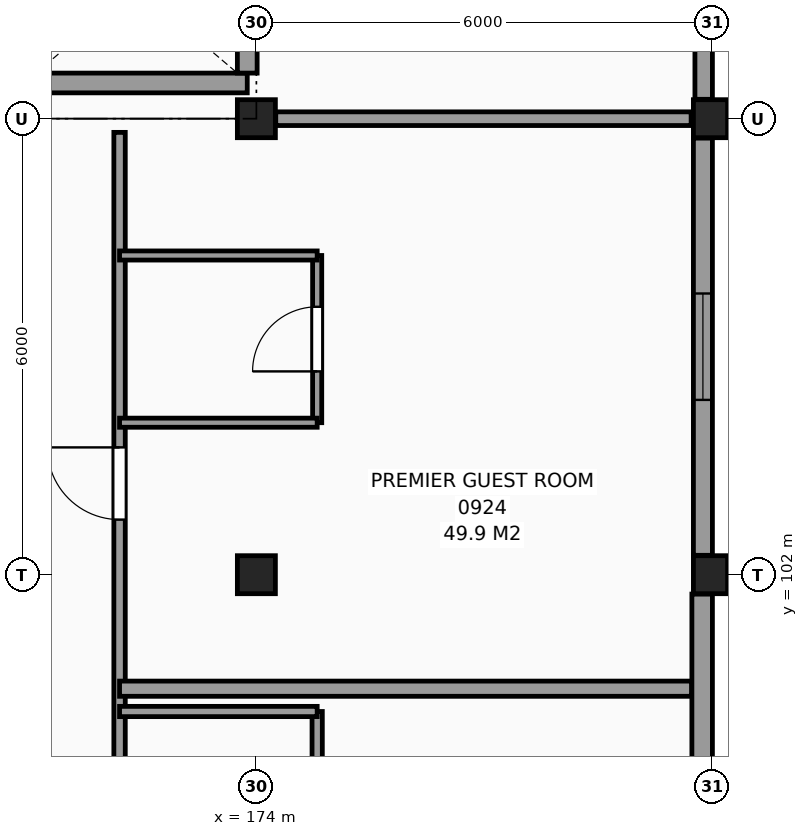
"""IFC4 building model, lengths in metres.
Left out: names, types, materials, properties, quantities, classifications, styles, units other than length and angle.
Written with IfcOpenShell. Run it as: python <this file> out.ifc"""

import sys

from ifc_helpers import new_model, si_unit, direction, frame, frame_2d, origin, origin_2d, place, context, subcontext, project, spatial, rectangle, extrude, element, fill, save


model = new_model("IFC4")
c1 = context("Model", 3, precision=1e-05, world=origin(), true_north=direction((0.0, 1.0)))
c2 = subcontext(c1, "Body", "Model", "MODEL_VIEW")
j1 = project(units=[si_unit("LENGTHUNIT", "METRE"), si_unit("PLANEANGLEUNIT", "RADIAN")], contexts=[c1])
p1 = place(None, origin())
s1 = spatial("IfcSite", under=j1, at=p1, CompositionType="ELEMENT")
p2 = place(p1, origin())
s2 = spatial("IfcBuilding", under=s1, at=p2, CompositionType="ELEMENT")
p3 = place(p2, frame((0.0, 0.0, 38.1)))
s3 = spatial("IfcBuildingStorey", under=s2, at=p3, CompositionType="ELEMENT", Elevation=38.1)
for number, where, z_axis, x_axis in (
    (1, (174.0, 102.0, 0.0), (0.0, 0.0, 1.0), (1.0, 0.0, 0.0)),
    (2, (174.0, 108.0, 0.0), (0.0, 0.0, 1.0), (1.0, 0.0, 0.0)),
    (3, (180.0, 102.0, 0.0), (0.0, 0.0, 1.0), (1.0, 0.0, 0.0)),
    (4, (180.0, 108.0, 0.0), (0.0, 0.0, 1.0), (1.0, 0.0, 0.0)),
):
    element("IfcColumn", number, at=place(p3, frame(where, z_axis=z_axis, x_axis=x_axis)), inside=s3, PredefinedType="COLUMN", context=c2, shape_type="SweptSolid", body=[
        extrude(rectangle(XDim=0.5, YDim=0.5, at=origin_2d()), origin(), (0.0, 0.0, 1.0), 3.3),
    ])
p4 = place(p3, frame((179.865, 96.255, 0.0), z_axis=(0.0, 0.0, 1.0), x_axis=(0.0, 1.0, 0.0)))
e5 = element("IfcWall", 5, at=p4, inside=s3, PredefinedType="SOLIDWALL", context=c2, shape_type="SweptSolid", body=[
    extrude(rectangle(XDim=5.49, YDim=0.27, at=frame_2d((2.745, 0.0))), origin(), (0.0, 0.0, 1.0), 2.41),
])
p5 = place(p4, frame((1.432, 0.0, 0.8)))
e6 = element("IfcOpeningElement", 6, at=p5, cuts=e5, PredefinedType="OPENING", context=c2, shape_type="SweptSolid", body=[
    extrude(rectangle(XDim=1.4, YDim=1.4, at=frame_2d((0.7, 0.7))), frame((0.0, 0.145, 0.0), z_axis=(0.0, -1.0, 0.0), x_axis=(1.0, 0.0, 0.0)), (0.0, 0.0, 1.0), 0.29),
])
p6 = place(p3, frame((179.875, 102.255, 0.0), z_axis=(0.0, 0.0, 1.0), x_axis=(0.0, 1.0, 0.0)))
e7 = element("IfcWall", 7, at=p6, inside=s3, PredefinedType="SOLIDWALL", context=c2, shape_type="SweptSolid", body=[
    extrude(rectangle(XDim=5.49, YDim=0.25, at=frame_2d((2.745, 0.0))), origin(), (0.0, 0.0, 1.0), 2.41),
])
p7 = place(p6, frame((2.045, 0.0, 0.8)))
e8 = element("IfcOpeningElement", 8, at=p7, cuts=e7, PredefinedType="OPENING", context=c2, shape_type="SweptSolid", body=[
    extrude(rectangle(XDim=1.4, YDim=1.4, at=frame_2d((0.7, 0.7))), frame((0.0, 0.135, 0.0), z_axis=(0.0, -1.0, 0.0), x_axis=(1.0, 0.0, 0.0)), (0.0, 0.0, 1.0), 0.27),
])
p8 = place(p3, frame((179.885, 108.255, 0.0), z_axis=(0.0, 0.0, 1.0), x_axis=(0.0, 1.0, 0.0)))
e9 = element("IfcWall", 9, at=p8, inside=s3, PredefinedType="SOLIDWALL", context=c2, shape_type="SweptSolid", body=[
    extrude(rectangle(XDim=5.49, YDim=0.23, at=frame_2d((2.745, 0.0))), origin(), (0.0, 0.0, 1.0), 2.41),
])
p9 = place(p3, frame((170.97, 108.47, 0.0), z_axis=(0.0, 0.0, 1.0), x_axis=(1.0, 0.0, 0.0)))
e10 = element("IfcWall", 10, at=p9, inside=s3, PredefinedType="SHEAR", context=c2, shape_type="SweptSolid", body=[
    extrude(rectangle(XDim=2.91, YDim=0.26, at=frame_2d((1.455, 0.0))), origin(), (0.0, 0.0, 1.0), 3.3),
])
p10 = place(p3, frame((173.88, 108.6, 0.0), z_axis=(0.0, 0.0, 1.0), x_axis=(0.0, 1.0, 0.0)))
e11 = element("IfcWall", 11, at=p10, inside=s3, PredefinedType="SHEAR", context=c2, shape_type="SweptSolid", body=[
    extrude(rectangle(XDim=2.25, YDim=0.26, at=frame_2d((1.125, 0.0))), origin(), (0.0, 0.0, 1.0), 3.3),
])
p11 = place(p3, frame((172.2, 42.215, 0.0), z_axis=(0.0, 0.0, 1.0), x_axis=(0.0, 1.0, 0.0)))
e12 = element("IfcWall", 12, at=p11, inside=s3, PredefinedType="PARTITIONING", context=c2, shape_type="SweptSolid", body=[
    extrude(rectangle(XDim=65.605, YDim=0.15, at=frame_2d((32.802, 0.0))), origin(), (0.0, 0.0, 1.0), 3.06),
])
p12 = place(p11, frame((0.46, 0.0, 0.0)))
e13 = element("IfcOpeningElement", 13, at=p12, cuts=e12, PredefinedType="OPENING", context=c2, shape_type="SweptSolid", body=[
    extrude(rectangle(XDim=0.95, YDim=2.1, at=frame_2d((0.475, 1.05))), frame((0.0, 0.085, 0.0), z_axis=(0.0, -1.0, 0.0), x_axis=(1.0, 0.0, 0.0)), (0.0, 0.0, 1.0), 0.17),
])
p13 = place(p11, frame((4.91, 0.0, 0.0)))
e14 = element("IfcOpeningElement", 14, at=p13, cuts=e12, PredefinedType="OPENING", context=c2, shape_type="SweptSolid", body=[
    extrude(rectangle(XDim=0.95, YDim=2.1, at=frame_2d((0.475, 1.05))), frame((0.0, 0.085, 0.0), z_axis=(0.0, -1.0, 0.0), x_axis=(1.0, 0.0, 0.0)), (0.0, 0.0, 1.0), 0.17),
])
p14 = place(p11, frame((12.11, 0.0, 0.0)))
e15 = element("IfcOpeningElement", 15, at=p14, cuts=e12, PredefinedType="OPENING", context=c2, shape_type="SweptSolid", body=[
    extrude(rectangle(XDim=0.95, YDim=2.1, at=frame_2d((0.475, 1.05))), frame((0.0, 0.085, 0.0), z_axis=(0.0, -1.0, 0.0), x_axis=(1.0, 0.0, 0.0)), (0.0, 0.0, 1.0), 0.17),
])
p15 = place(p11, frame((20.36, 0.0, 0.0)))
e16 = element("IfcOpeningElement", 16, at=p15, cuts=e12, PredefinedType="OPENING", context=c2, shape_type="SweptSolid", body=[
    extrude(rectangle(XDim=0.95, YDim=2.1, at=frame_2d((0.475, 1.05))), frame((0.0, 0.085, 0.0), z_axis=(0.0, -1.0, 0.0), x_axis=(1.0, 0.0, 0.0)), (0.0, 0.0, 1.0), 0.17),
])
p16 = place(p11, frame((22.91, 0.0, 0.0)))
e17 = element("IfcOpeningElement", 17, at=p16, cuts=e12, PredefinedType="OPENING", context=c2, shape_type="SweptSolid", body=[
    extrude(rectangle(XDim=0.95, YDim=2.1, at=frame_2d((0.475, 1.05))), frame((0.0, 0.085, 0.0), z_axis=(0.0, -1.0, 0.0), x_axis=(1.0, 0.0, 0.0)), (0.0, 0.0, 1.0), 0.17),
])
p17 = place(p11, frame((30.11, 0.0, 0.0)))
e18 = element("IfcOpeningElement", 18, at=p17, cuts=e12, PredefinedType="OPENING", context=c2, shape_type="SweptSolid", body=[
    extrude(rectangle(XDim=0.95, YDim=2.1, at=frame_2d((0.475, 1.05))), frame((0.0, 0.085, 0.0), z_axis=(0.0, -1.0, 0.0), x_axis=(1.0, 0.0, 0.0)), (0.0, 0.0, 1.0), 0.17),
])
p18 = place(p11, frame((34.31, 0.0, 0.0)))
e19 = element("IfcOpeningElement", 19, at=p18, cuts=e12, PredefinedType="OPENING", context=c2, shape_type="SweptSolid", body=[
    extrude(rectangle(XDim=0.95, YDim=2.1, at=frame_2d((0.475, 1.05))), frame((0.0, 0.085, 0.0), z_axis=(0.0, -1.0, 0.0), x_axis=(1.0, 0.0, 0.0)), (0.0, 0.0, 1.0), 0.17),
])
p19 = place(p11, frame((43.61, 0.0, 0.0)))
e20 = element("IfcOpeningElement", 20, at=p19, cuts=e12, PredefinedType="OPENING", context=c2, shape_type="SweptSolid", body=[
    extrude(rectangle(XDim=0.95, YDim=2.1, at=frame_2d((0.475, 1.05))), frame((0.0, 0.085, 0.0), z_axis=(0.0, -1.0, 0.0), x_axis=(1.0, 0.0, 0.0)), (0.0, 0.0, 1.0), 0.17),
])
p20 = place(p11, frame((48.11, 0.0, 0.0)))
e21 = element("IfcOpeningElement", 21, at=p20, cuts=e12, PredefinedType="OPENING", context=c2, shape_type="SweptSolid", body=[
    extrude(rectangle(XDim=0.95, YDim=2.1, at=frame_2d((0.475, 1.05))), frame((0.0, 0.085, 0.0), z_axis=(0.0, -1.0, 0.0), x_axis=(1.0, 0.0, 0.0)), (0.0, 0.0, 1.0), 0.17),
])
p21 = place(p11, frame((52.31, 0.0, 0.0)))
e22 = element("IfcOpeningElement", 22, at=p21, cuts=e12, PredefinedType="OPENING", context=c2, shape_type="SweptSolid", body=[
    extrude(rectangle(XDim=0.95, YDim=2.1, at=frame_2d((0.475, 1.05))), frame((0.0, 0.085, 0.0), z_axis=(0.0, -1.0, 0.0), x_axis=(1.0, 0.0, 0.0)), (0.0, 0.0, 1.0), 0.17),
])
p22 = place(p11, frame((54.51, 0.0, 0.0)))
e23 = element("IfcOpeningElement", 23, at=p22, cuts=e12, PredefinedType="OPENING", context=c2, shape_type="SweptSolid", body=[
    extrude(rectangle(XDim=0.95, YDim=2.1, at=frame_2d((0.475, 1.05))), frame((0.0, 0.085, 0.0), z_axis=(0.0, -1.0, 0.0), x_axis=(1.0, 0.0, 0.0)), (0.0, 0.0, 1.0), 0.17),
])
p23 = place(p11, frame((60.51, 0.0, 0.0)))
e24 = element("IfcOpeningElement", 24, at=p23, cuts=e12, PredefinedType="OPENING", context=c2, shape_type="SweptSolid", body=[
    extrude(rectangle(XDim=0.95, YDim=2.1, at=frame_2d((0.475, 1.05))), frame((0.0, 0.085, 0.0), z_axis=(0.0, -1.0, 0.0), x_axis=(1.0, 0.0, 0.0)), (0.0, 0.0, 1.0), 0.17),
])
p24 = place(p3, frame((174.8, 98.0, 0.0), z_axis=(0.0, 0.0, 1.0), x_axis=(0.0, 1.0, 0.0)))
e25 = element("IfcWall", 25, at=p24, inside=s3, PredefinedType="PARTITIONING", context=c2, shape_type="SweptSolid", body=[
    extrude(rectangle(XDim=2.2, YDim=0.135, at=frame_2d((1.1, 0.0))), origin(), (0.0, 0.0, 1.0), 3.06),
])
p25 = place(p24, frame((0.675, 0.0, 0.0)))
e26 = element("IfcOpeningElement", 26, at=p25, cuts=e25, PredefinedType="OPENING", context=c2, shape_type="SweptSolid", body=[
    extrude(rectangle(XDim=0.85, YDim=2.1, at=frame_2d((0.425, 1.05))), frame((0.0, 0.078, 0.0), z_axis=(0.0, -1.0, 0.0), x_axis=(1.0, 0.0, 0.0)), (0.0, 0.0, 1.0), 0.155),
])
p26 = place(p3, frame((174.8, 104.0, 0.0), z_axis=(0.0, 0.0, 1.0), x_axis=(0.0, 1.0, 0.0)))
e27 = element("IfcWall", 27, at=p26, inside=s3, PredefinedType="PARTITIONING", context=c2, shape_type="SweptSolid", body=[
    extrude(rectangle(XDim=2.2, YDim=0.12, at=frame_2d((1.1, 0.0))), origin(), (0.0, 0.0, 1.0), 3.06),
])
p27 = place(p26, frame((0.675, 0.0, 0.0)))
e28 = element("IfcOpeningElement", 28, at=p27, cuts=e27, PredefinedType="OPENING", context=c2, shape_type="SweptSolid", body=[
    extrude(rectangle(XDim=0.85, YDim=2.1, at=frame_2d((0.425, 1.05))), frame((0.0, 0.07, 0.0), z_axis=(0.0, -1.0, 0.0), x_axis=(1.0, 0.0, 0.0)), (0.0, 0.0, 1.0), 0.14),
])
p28 = place(p3, frame((172.2, 100.2, 0.0), z_axis=(0.0, 0.0, 1.0), x_axis=(1.0, 0.0, 0.0)))
e29 = element("IfcWall", 29, at=p28, inside=s3, PredefinedType="PARTITIONING", context=c2, shape_type="SweptSolid", body=[
    extrude(rectangle(XDim=2.6, YDim=0.135, at=frame_2d((1.3, 0.0))), origin(), (0.0, 0.0, 1.0), 3.06),
])
p29 = place(p3, frame((172.2, 100.5, 0.0), z_axis=(0.0, 0.0, 1.0), x_axis=(1.0, 0.0, 0.0)))
e30 = element("IfcWall", 30, at=p29, inside=s3, PredefinedType="PARTITIONING", context=c2, shape_type="SweptSolid", body=[
    extrude(rectangle(XDim=7.525, YDim=0.2, at=frame_2d((3.763, 0.0))), origin(), (0.0, 0.0, 1.0), 3.06),
])
for number, where, z_axis, x_axis in (
    (31, (172.2, 104.0, 0.0), (0.0, 0.0, 1.0), (1.0, 0.0, 0.0)),
    (32, (172.2, 106.2, 0.0), (0.0, 0.0, 1.0), (1.0, 0.0, 0.0)),
):
    element("IfcWall", number, at=place(p3, frame(where, z_axis=z_axis, x_axis=x_axis)), inside=s3, PredefinedType="PARTITIONING", context=c2, shape_type="SweptSolid", body=[
        extrude(rectangle(XDim=2.6, YDim=0.12, at=frame_2d((1.3, 0.0))), origin(), (0.0, 0.0, 1.0), 3.06),
    ])
p30 = place(p3, frame((174.255, 108.0, 0.0), z_axis=(0.0, 0.0, 1.0), x_axis=(1.0, 0.0, 0.0)))
e33 = element("IfcWall", 33, at=p30, inside=s3, PredefinedType="PARTITIONING", context=c2, shape_type="SweptSolid", body=[
    extrude(rectangle(XDim=5.465, YDim=0.18, at=frame_2d((2.732, 0.0))), origin(), (0.0, 0.0, 1.0), 2.77),
])
p31 = place(p7, origin())
e34 = element("IfcWindow", 34, at=p31, inside=s3, PartitioningType="SINGLE_PANEL", PredefinedType="WINDOW", context=c2, shape_type="SweptSolid", body=[
    extrude(rectangle(XDim=1.4, YDim=1.4, at=frame_2d((0.7, 0.7))), frame((0.0, 0.03, 0.0), z_axis=(0.0, -1.0, 0.0), x_axis=(1.0, 0.0, 0.0)), (0.0, 0.0, 1.0), 0.06),
])
fill(e8, e34)
p32 = place(p27, origin())
e35 = element("IfcDoor", 35, at=p32, inside=s3, OperationType="SINGLE_SWING_LEFT", PredefinedType="DOOR", context=c2, shape_type="SweptSolid", body=[
    extrude(rectangle(XDim=0.85, YDim=2.1, at=frame_2d((0.425, 1.05))), frame((0.0, 0.025, 0.0), z_axis=(0.0, -1.0, 0.0), x_axis=(1.0, 0.0, 0.0)), (0.0, 0.0, 1.0), 0.05),
])
fill(e28, e35)
p33 = place(p23, origin())
e36 = element("IfcDoor", 36, at=p33, inside=s3, OperationType="SINGLE_SWING_RIGHT", PredefinedType="DOOR", context=c2, shape_type="SweptSolid", body=[
    extrude(rectangle(XDim=0.95, YDim=2.1, at=frame_2d((0.475, 1.05))), frame((0.0, 0.025, 0.0), z_axis=(0.0, -1.0, 0.0), x_axis=(1.0, 0.0, 0.0)), (0.0, 0.0, 1.0), 0.05),
])
fill(e24, e36)
save(model, sys.argv[1])
